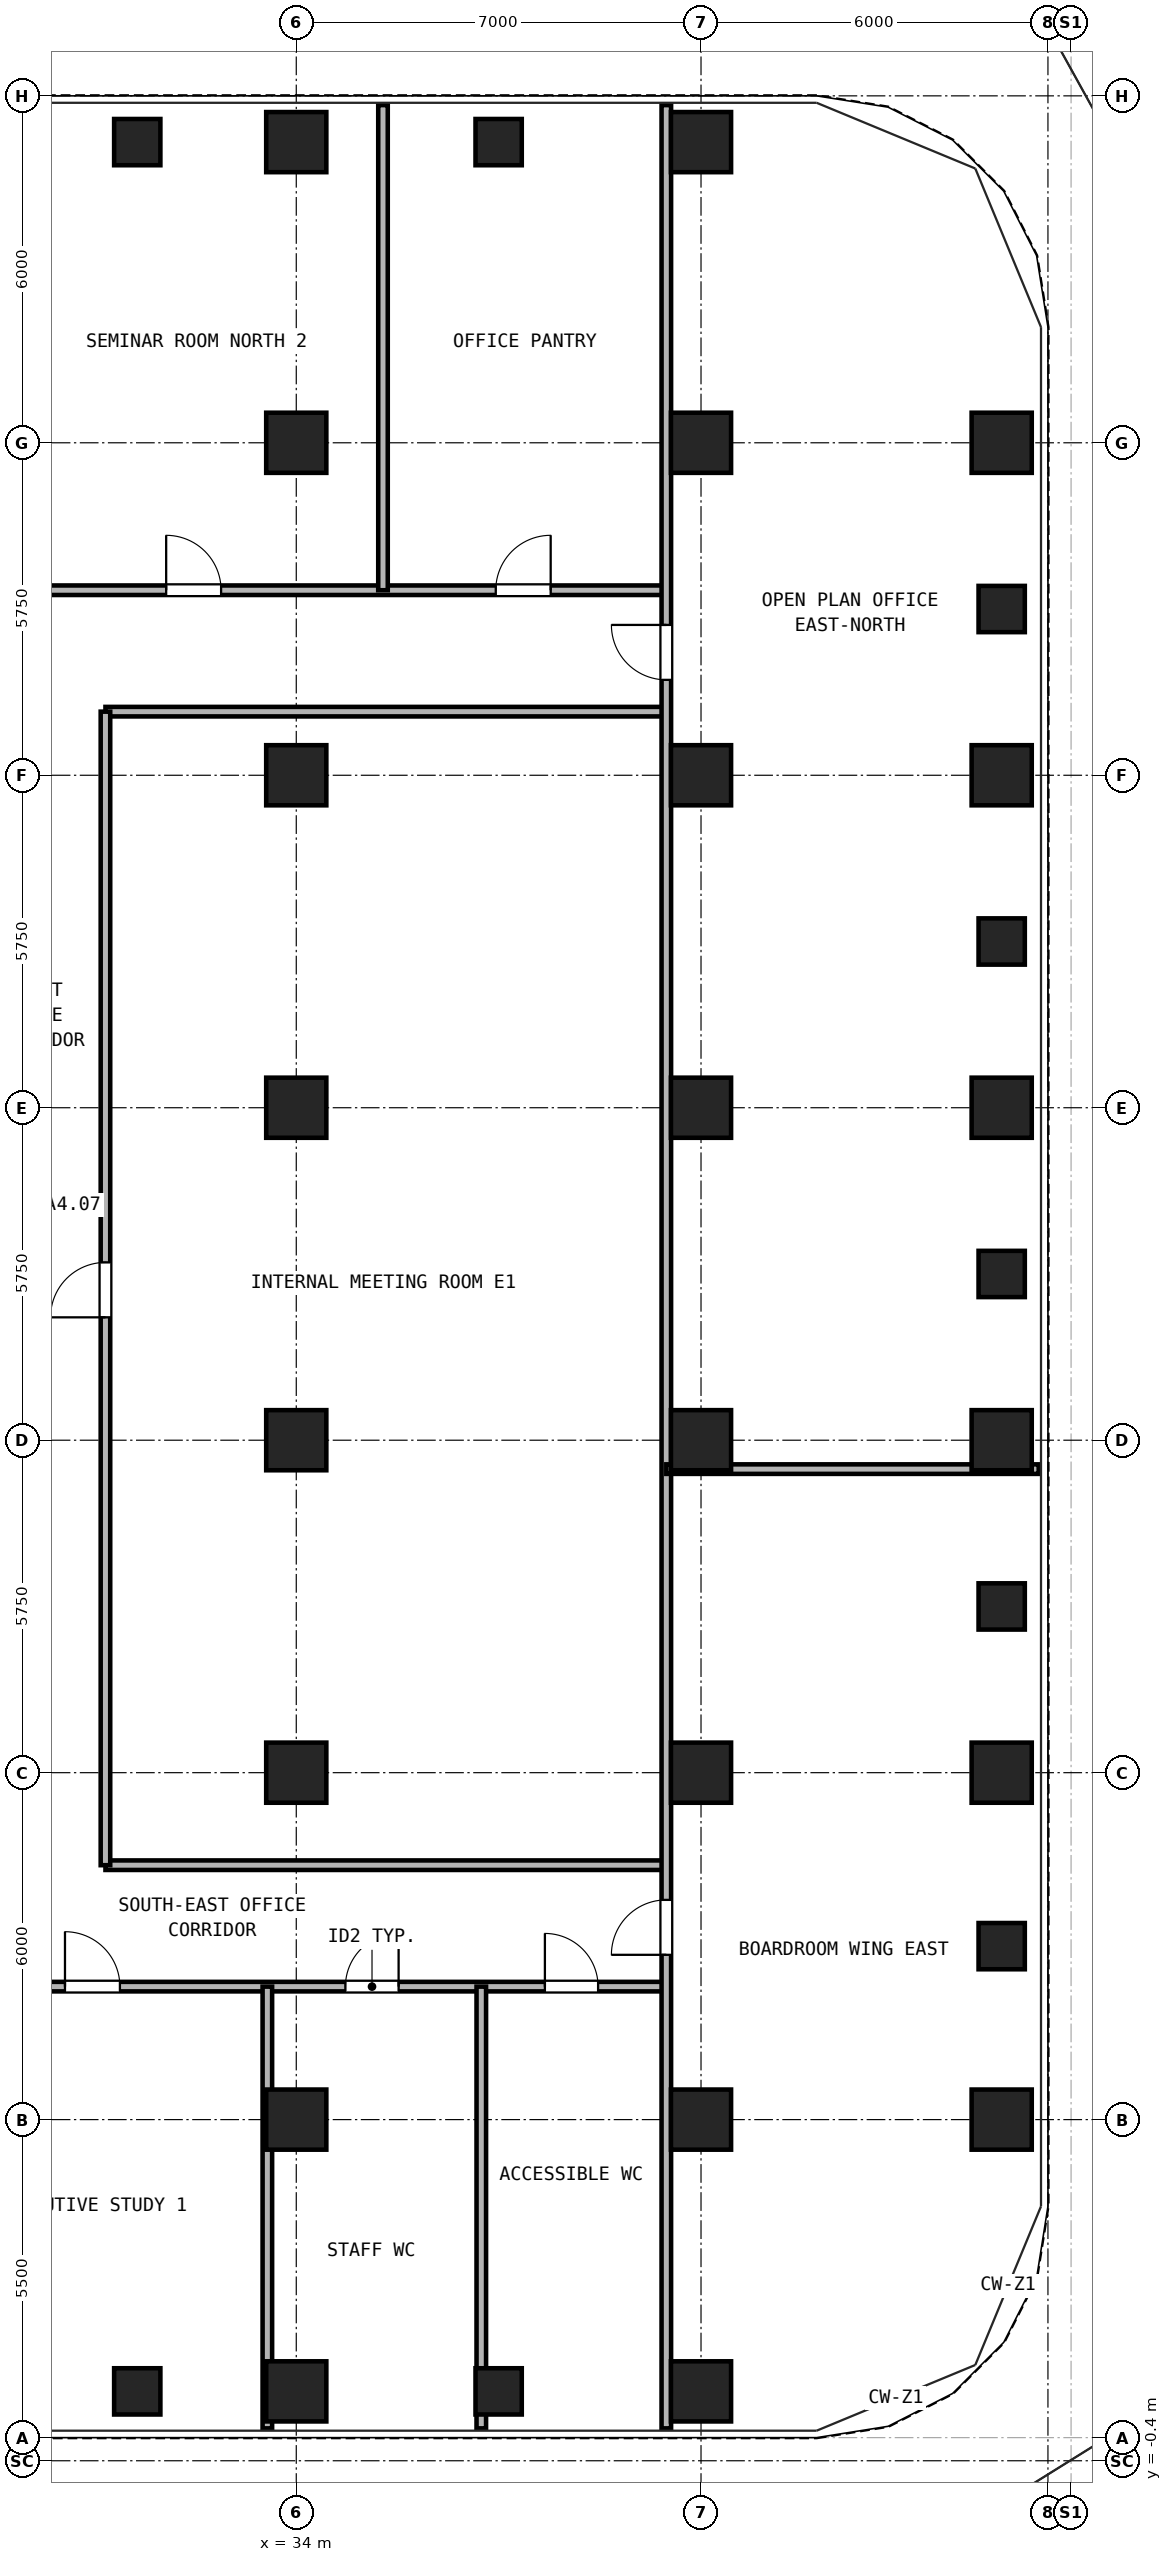
"""IFC4 building model, lengths in metres.
Left out: names, types, materials, properties, quantities, classifications, styles, units other than length and angle.
Written with IfcOpenShell. Run it as: python <this file> out.ifc"""

import sys

from ifc_helpers import new_model, si_unit, direction, frame, frame_2d, origin, origin_2d, place, context, subcontext, project, spatial, rectangle, hollow_rectangle, extrude, source, transform, mapped, element, fill, save


model = new_model("IFC4")
c1 = context("Model", 3, precision=1e-05, world=origin(), true_north=direction((0.0, 1.0)))
c2 = subcontext(c1, "Body", "Model", "MODEL_VIEW")
j1 = project(units=[si_unit("LENGTHUNIT", "METRE"), si_unit("PLANEANGLEUNIT", "RADIAN")], contexts=[c1])
p1 = place(None, origin())
s1 = spatial("IfcSite", under=j1, at=p1, CompositionType="ELEMENT")
p2 = place(p1, origin())
s2 = spatial("IfcBuilding", under=s1, at=p2, CompositionType="ELEMENT")
p3 = place(p2, frame((0.0, 0.0, 81.0)))
s3 = spatial("IfcBuildingStorey", under=s2, at=p3, CompositionType="ELEMENT", Elevation=81.0)
m1 = source(origin(), c2, "Body", "SweptSolid", [
    extrude(hollow_rectangle(XDim=1.04, YDim=1.04, WallThickness=0.065, at=origin_2d()), origin(), (0.0, 0.0, 1.0), 3.32),
])
for number, where, z_axis, x_axis in (
    (1, (34.0, 0.8, 0.0), (0.0, 0.0, 1.0), (1.0, 0.0, 0.0)),
    (2, (34.0, 39.7, 0.0), (0.0, 0.0, 1.0), (1.0, 0.0, 0.0)),
    (3, (41.0, 0.8, 0.0), (0.0, 0.0, 1.0), (1.0, 0.0, 0.0)),
    (4, (41.0, 39.7, 0.0), (0.0, 0.0, 1.0), (1.0, 0.0, 0.0)),
    (5, (46.2, 5.5, 0.0), (0.0, 0.0, 1.0), (1.0, 0.0, 0.0)),
    (6, (46.2, 11.5, 0.0), (0.0, 0.0, 1.0), (1.0, 0.0, 0.0)),
    (7, (46.2, 17.25, 0.0), (0.0, 0.0, 1.0), (1.0, 0.0, 0.0)),
    (8, (46.2, 23.0, 0.0), (0.0, 0.0, 1.0), (1.0, 0.0, 0.0)),
    (9, (46.2, 28.75, 0.0), (0.0, 0.0, 1.0), (1.0, 0.0, 0.0)),
    (10, (46.2, 34.5, 0.0), (0.0, 0.0, 1.0), (1.0, 0.0, 0.0)),
    (11, (34.0, 5.5, 0.0), (0.0, 0.0, 1.0), (1.0, 0.0, 0.0)),
    (12, (34.0, 11.5, 0.0), (0.0, 0.0, 1.0), (1.0, 0.0, 0.0)),
    (13, (34.0, 17.25, 0.0), (0.0, 0.0, 1.0), (1.0, 0.0, 0.0)),
    (14, (34.0, 23.0, 0.0), (0.0, 0.0, 1.0), (1.0, 0.0, 0.0)),
    (15, (34.0, 28.75, 0.0), (0.0, 0.0, 1.0), (1.0, 0.0, 0.0)),
    (16, (34.0, 34.5, 0.0), (0.0, 0.0, 1.0), (1.0, 0.0, 0.0)),
    (17, (41.0, 5.5, 0.0), (0.0, 0.0, 1.0), (1.0, 0.0, 0.0)),
    (18, (41.0, 11.5, 0.0), (0.0, 0.0, 1.0), (1.0, 0.0, 0.0)),
    (19, (41.0, 17.25, 0.0), (0.0, 0.0, 1.0), (1.0, 0.0, 0.0)),
    (20, (41.0, 23.0, 0.0), (0.0, 0.0, 1.0), (1.0, 0.0, 0.0)),
    (21, (41.0, 28.75, 0.0), (0.0, 0.0, 1.0), (1.0, 0.0, 0.0)),
    (22, (41.0, 34.5, 0.0), (0.0, 0.0, 1.0), (1.0, 0.0, 0.0)),
):
    element("IfcColumn", number, at=place(p3, frame(where, z_axis=z_axis, x_axis=x_axis)), inside=s3, PredefinedType="COLUMN", context=c2, shape_type="MappedRepresentation", body=[
        mapped(m1, transform((0.0, 0.0, 0.0), x_axis=(1.0, 0.0, 0.0), y_axis=(0.0, 1.0, 0.0), z_axis=(0.0, 0.0, 1.0), scale=1.0)),
    ])
m2 = source(origin(), c2, "Body", "SweptSolid", [
    extrude(hollow_rectangle(XDim=0.8, YDim=0.8, WallThickness=0.045, at=origin_2d()), origin(), (0.0, 0.0, 1.0), 3.32),
])
for number, where, z_axis, x_axis in (
    (23, (31.25, 0.8, 0.0), (0.0, 0.0, 1.0), (1.0, 0.0, 0.0)),
    (24, (31.25, 39.7, 0.0), (0.0, 0.0, 1.0), (1.0, 0.0, 0.0)),
    (25, (37.5, 0.8, 0.0), (0.0, 0.0, 1.0), (1.0, 0.0, 0.0)),
    (26, (37.5, 39.7, 0.0), (0.0, 0.0, 1.0), (1.0, 0.0, 0.0)),
    (27, (46.2, 8.5, 0.0), (0.0, 0.0, 1.0), (1.0, 0.0, 0.0)),
    (28, (46.2, 14.375, 0.0), (0.0, 0.0, 1.0), (1.0, 0.0, 0.0)),
    (29, (46.2, 20.125, 0.0), (0.0, 0.0, 1.0), (1.0, 0.0, 0.0)),
    (30, (46.2, 25.875, 0.0), (0.0, 0.0, 1.0), (1.0, 0.0, 0.0)),
    (31, (46.2, 31.625, 0.0), (0.0, 0.0, 1.0), (1.0, 0.0, 0.0)),
):
    element("IfcColumn", number, at=place(p3, frame(where, z_axis=z_axis, x_axis=x_axis)), inside=s3, PredefinedType="COLUMN", context=c2, shape_type="MappedRepresentation", body=[
        mapped(m2, transform((0.0, 0.0, 0.0), x_axis=(1.0, 0.0, 0.0), y_axis=(0.0, 1.0, 0.0), z_axis=(0.0, 0.0, 1.0), scale=1.0)),
    ])
p4 = place(p3, frame((6.6, 7.8, 0.0), z_axis=(0.0, 0.0, 1.0), x_axis=(1.0, 0.0, 0.0)))
e32 = element("IfcWall", 32, at=p4, inside=s3, PredefinedType="PARTITIONING", context=c2, shape_type="SweptSolid", body=[
    extrude(rectangle(XDim=33.8, YDim=0.165, at=frame_2d((16.9, 0.0))), origin(), (0.0, 0.0, 1.0), 3.32),
])
p5 = place(p4, frame((2.95, 0.0, 0.0)))
e33 = element("IfcOpeningElement", 33, at=p5, cuts=e32, PredefinedType="OPENING", context=c2, shape_type="SweptSolid", body=[
    extrude(rectangle(XDim=0.95, YDim=2.15, at=frame_2d((0.475, 1.075))), frame((0.0, 0.093, 0.0), z_axis=(0.0, -1.0, 0.0), x_axis=(1.0, 0.0, 0.0)), (0.0, 0.0, 1.0), 0.185),
])
p6 = place(p4, frame((9.9, 0.0, 0.0)))
e34 = element("IfcOpeningElement", 34, at=p6, cuts=e32, PredefinedType="OPENING", context=c2, shape_type="SweptSolid", body=[
    extrude(rectangle(XDim=0.95, YDim=2.15, at=frame_2d((0.475, 1.075))), frame((0.0, 0.093, 0.0), z_axis=(0.0, -1.0, 0.0), x_axis=(1.0, 0.0, 0.0)), (0.0, 0.0, 1.0), 0.185),
])
p7 = place(p4, frame((16.9, 0.0, 0.0)))
e35 = element("IfcOpeningElement", 35, at=p7, cuts=e32, PredefinedType="OPENING", context=c2, shape_type="SweptSolid", body=[
    extrude(rectangle(XDim=0.95, YDim=2.15, at=frame_2d((0.475, 1.075))), frame((0.0, 0.093, 0.0), z_axis=(0.0, -1.0, 0.0), x_axis=(1.0, 0.0, 0.0)), (0.0, 0.0, 1.0), 0.185),
])
p8 = place(p4, frame((23.4, 0.0, 0.0)))
e36 = element("IfcOpeningElement", 36, at=p8, cuts=e32, PredefinedType="OPENING", context=c2, shape_type="SweptSolid", body=[
    extrude(rectangle(XDim=0.95, YDim=2.15, at=frame_2d((0.475, 1.075))), frame((0.0, 0.093, 0.0), z_axis=(0.0, -1.0, 0.0), x_axis=(1.0, 0.0, 0.0)), (0.0, 0.0, 1.0), 0.185),
])
p9 = place(p4, frame((28.25, 0.0, 0.0)))
e37 = element("IfcOpeningElement", 37, at=p9, cuts=e32, PredefinedType="OPENING", context=c2, shape_type="SweptSolid", body=[
    extrude(rectangle(XDim=0.92, YDim=2.1, at=frame_2d((0.46, 1.05))), frame((0.0, 0.093, 0.0), z_axis=(0.0, -1.0, 0.0), x_axis=(1.0, 0.0, 0.0)), (0.0, 0.0, 1.0), 0.185),
])
p10 = place(p4, frame((31.7, 0.0, 0.0)))
e38 = element("IfcOpeningElement", 38, at=p10, cuts=e32, PredefinedType="OPENING", context=c2, shape_type="SweptSolid", body=[
    extrude(rectangle(XDim=0.92, YDim=2.1, at=frame_2d((0.46, 1.05))), frame((0.0, 0.093, 0.0), z_axis=(0.0, -1.0, 0.0), x_axis=(1.0, 0.0, 0.0)), (0.0, 0.0, 1.0), 0.185),
])
p11 = place(p3, frame((6.6, 31.95, 0.0), z_axis=(0.0, 0.0, 1.0), x_axis=(1.0, 0.0, 0.0)))
e39 = element("IfcWall", 39, at=p11, inside=s3, PredefinedType="PARTITIONING", context=c2, shape_type="SweptSolid", body=[
    extrude(rectangle(XDim=33.8, YDim=0.165, at=frame_2d((16.9, 0.0))), origin(), (0.0, 0.0, 1.0), 3.32),
])
p12 = place(p11, frame((3.2, 0.0, 0.0)))
e40 = element("IfcOpeningElement", 40, at=p12, cuts=e39, PredefinedType="OPENING", context=c2, shape_type="SweptSolid", body=[
    extrude(rectangle(XDim=0.95, YDim=2.15, at=frame_2d((0.475, 1.075))), frame((0.0, 0.093, 0.0), z_axis=(0.0, -1.0, 0.0), x_axis=(1.0, 0.0, 0.0)), (0.0, 0.0, 1.0), 0.185),
])
p13 = place(p11, frame((10.65, 0.0, 0.0)))
e41 = element("IfcOpeningElement", 41, at=p13, cuts=e39, PredefinedType="OPENING", context=c2, shape_type="SweptSolid", body=[
    extrude(rectangle(XDim=0.95, YDim=2.15, at=frame_2d((0.475, 1.075))), frame((0.0, 0.093, 0.0), z_axis=(0.0, -1.0, 0.0), x_axis=(1.0, 0.0, 0.0)), (0.0, 0.0, 1.0), 0.185),
])
p14 = place(p11, frame((18.15, 0.0, 0.0)))
e42 = element("IfcOpeningElement", 42, at=p14, cuts=e39, PredefinedType="OPENING", context=c2, shape_type="SweptSolid", body=[
    extrude(rectangle(XDim=0.95, YDim=2.15, at=frame_2d((0.475, 1.075))), frame((0.0, 0.093, 0.0), z_axis=(0.0, -1.0, 0.0), x_axis=(1.0, 0.0, 0.0)), (0.0, 0.0, 1.0), 0.185),
])
p15 = place(p11, frame((25.15, 0.0, 0.0)))
e43 = element("IfcOpeningElement", 43, at=p15, cuts=e39, PredefinedType="OPENING", context=c2, shape_type="SweptSolid", body=[
    extrude(rectangle(XDim=0.95, YDim=2.15, at=frame_2d((0.475, 1.075))), frame((0.0, 0.093, 0.0), z_axis=(0.0, -1.0, 0.0), x_axis=(1.0, 0.0, 0.0)), (0.0, 0.0, 1.0), 0.185),
])
p16 = place(p11, frame((30.85, 0.0, 0.0)))
e44 = element("IfcOpeningElement", 44, at=p16, cuts=e39, PredefinedType="OPENING", context=c2, shape_type="SweptSolid", body=[
    extrude(rectangle(XDim=0.95, YDim=2.15, at=frame_2d((0.475, 1.075))), frame((0.0, 0.093, 0.0), z_axis=(0.0, -1.0, 0.0), x_axis=(1.0, 0.0, 0.0)), (0.0, 0.0, 1.0), 0.185),
])
for number, where, z_axis, x_axis in (
    (45, (30.7, 9.9, 0.0), (0.0, 0.0, 1.0), (1.0, 0.0, 0.0)),
    (46, (30.7, 29.85, 0.0), (0.0, 0.0, 1.0), (1.0, 0.0, 0.0)),
):
    element("IfcWall", number, at=place(p3, frame(where, z_axis=z_axis, x_axis=x_axis)), inside=s3, PredefinedType="PARTITIONING", context=c2, shape_type="SweptSolid", body=[
        extrude(rectangle(XDim=9.7, YDim=0.165, at=frame_2d((4.85, 0.0))), origin(), (0.0, 0.0, 1.0), 3.32),
    ])
p17 = place(p3, frame((30.7, 9.9, 0.0), z_axis=(0.0, 0.0, 1.0), x_axis=(0.0, 1.0, 0.0)))
e47 = element("IfcWall", 47, at=p17, inside=s3, PredefinedType="PARTITIONING", context=c2, shape_type="SweptSolid", body=[
    extrude(rectangle(XDim=19.95, YDim=0.165, at=frame_2d((9.975, 0.0))), origin(), (0.0, 0.0, 1.0), 3.32),
])
p18 = place(p17, frame((9.475, 0.0, 0.0)))
e48 = element("IfcOpeningElement", 48, at=p18, cuts=e47, PredefinedType="OPENING", context=c2, shape_type="SweptSolid", body=[
    extrude(rectangle(XDim=0.95, YDim=2.15, at=frame_2d((0.475, 1.075))), frame((0.0, 0.093, 0.0), z_axis=(0.0, -1.0, 0.0), x_axis=(1.0, 0.0, 0.0)), (0.0, 0.0, 1.0), 0.185),
])
p19 = place(p3, frame((40.4, 0.16, 0.0), z_axis=(0.0, 0.0, 1.0), x_axis=(0.0, 1.0, 0.0)))
e49 = element("IfcWall", 49, at=p19, inside=s3, PredefinedType="PARTITIONING", context=c2, shape_type="SweptSolid", body=[
    extrude(rectangle(XDim=40.18, YDim=0.165, at=frame_2d((20.09, 0.0))), origin(), (0.0, 0.0, 1.0), 3.32),
])
p20 = place(p19, frame((8.19, 0.0, 0.0)))
e50 = element("IfcOpeningElement", 50, at=p20, cuts=e49, PredefinedType="OPENING", context=c2, shape_type="SweptSolid", body=[
    extrude(rectangle(XDim=0.95, YDim=2.15, at=frame_2d((0.475, 1.075))), frame((0.0, 0.093, 0.0), z_axis=(0.0, -1.0, 0.0), x_axis=(1.0, 0.0, 0.0)), (0.0, 0.0, 1.0), 0.185),
])
p21 = place(p19, frame((30.24, 0.0, 0.0)))
e51 = element("IfcOpeningElement", 51, at=p21, cuts=e49, PredefinedType="OPENING", context=c2, shape_type="SweptSolid", body=[
    extrude(rectangle(XDim=0.95, YDim=2.15, at=frame_2d((0.475, 1.075))), frame((0.0, 0.093, 0.0), z_axis=(0.0, -1.0, 0.0), x_axis=(1.0, 0.0, 0.0)), (0.0, 0.0, 1.0), 0.185),
])
for number, where, z_axis, x_axis in (
    (52, (33.5, 0.16, 0.0), (0.0, 0.0, 1.0), (0.0, 1.0, 0.0)),
    (53, (37.2, 0.16, 0.0), (0.0, 0.0, 1.0), (0.0, 1.0, 0.0)),
):
    element("IfcWall", number, at=place(p3, frame(where, z_axis=z_axis, x_axis=x_axis)), inside=s3, PredefinedType="PARTITIONING", context=c2, shape_type="SweptSolid", body=[
        extrude(rectangle(XDim=7.64, YDim=0.165, at=frame_2d((3.82, 0.0))), origin(), (0.0, 0.0, 1.0), 3.32),
    ])
p22 = place(p3, frame((35.5, 31.95, 0.0), z_axis=(0.0, 0.0, 1.0), x_axis=(0.0, 1.0, 0.0)))
e54 = element("IfcWall", 54, at=p22, inside=s3, PredefinedType="PARTITIONING", context=c2, shape_type="SweptSolid", body=[
    extrude(rectangle(XDim=8.39, YDim=0.165, at=frame_2d((4.195, 0.0))), origin(), (0.0, 0.0, 1.0), 3.32),
])
p23 = place(p3, frame((40.4, 16.75, 0.0), z_axis=(0.0, 0.0, 1.0), x_axis=(1.0, 0.0, 0.0)))
e55 = element("IfcWall", 55, at=p23, inside=s3, PredefinedType="PARTITIONING", context=c2, shape_type="SweptSolid", body=[
    extrude(rectangle(XDim=6.44, YDim=0.165, at=frame_2d((3.22, 0.0))), origin(), (0.0, 0.0, 1.0), 3.32),
])
p24 = place(p8, frame((0.95, 0.0, 0.0), z_axis=(0.0, 0.0, 1.0), x_axis=(-1.0, 0.0, 0.0)))
e56 = element("IfcDoor", 56, at=p24, inside=s3, OperationType="SINGLE_SWING_LEFT", PredefinedType="DOOR", context=c2, shape_type="SweptSolid", body=[
    extrude(rectangle(XDim=0.95, YDim=2.15, at=frame_2d((0.475, 1.075))), frame((0.0, 0.025, 0.0), z_axis=(0.0, -1.0, 0.0), x_axis=(1.0, 0.0, 0.0)), (0.0, 0.0, 1.0), 0.05),
])
fill(e36, e56)
p25 = place(p9, frame((0.92, 0.0, 0.0), z_axis=(0.0, 0.0, 1.0), x_axis=(-1.0, 0.0, 0.0)))
e57 = element("IfcDoor", 57, at=p25, inside=s3, OperationType="SINGLE_SWING_RIGHT", PredefinedType="DOOR", context=c2, shape_type="SweptSolid", body=[
    extrude(rectangle(XDim=0.92, YDim=2.1, at=frame_2d((0.46, 1.05))), frame((0.0, 0.025, 0.0), z_axis=(0.0, -1.0, 0.0), x_axis=(1.0, 0.0, 0.0)), (0.0, 0.0, 1.0), 0.05),
])
fill(e37, e57)
p26 = place(p10, frame((0.92, 0.0, 0.0), z_axis=(0.0, 0.0, 1.0), x_axis=(-1.0, 0.0, 0.0)))
e58 = element("IfcDoor", 58, at=p26, inside=s3, OperationType="SINGLE_SWING_LEFT", PredefinedType="DOOR", context=c2, shape_type="SweptSolid", body=[
    extrude(rectangle(XDim=0.92, YDim=2.1, at=frame_2d((0.46, 1.05))), frame((0.0, 0.025, 0.0), z_axis=(0.0, -1.0, 0.0), x_axis=(1.0, 0.0, 0.0)), (0.0, 0.0, 1.0), 0.05),
])
fill(e38, e58)
p27 = place(p15, origin())
e59 = element("IfcDoor", 59, at=p27, inside=s3, OperationType="SINGLE_SWING_LEFT", PredefinedType="DOOR", context=c2, shape_type="SweptSolid", body=[
    extrude(rectangle(XDim=0.95, YDim=2.15, at=frame_2d((0.475, 1.075))), frame((0.0, 0.025, 0.0), z_axis=(0.0, -1.0, 0.0), x_axis=(1.0, 0.0, 0.0)), (0.0, 0.0, 1.0), 0.05),
])
fill(e43, e59)
p28 = place(p16, origin())
e60 = element("IfcDoor", 60, at=p28, inside=s3, OperationType="SINGLE_SWING_RIGHT", PredefinedType="DOOR", context=c2, shape_type="SweptSolid", body=[
    extrude(rectangle(XDim=0.95, YDim=2.15, at=frame_2d((0.475, 1.075))), frame((0.0, 0.025, 0.0), z_axis=(0.0, -1.0, 0.0), x_axis=(1.0, 0.0, 0.0)), (0.0, 0.0, 1.0), 0.05),
])
fill(e44, e60)
p29 = place(p20, origin())
e61 = element("IfcDoor", 61, at=p29, inside=s3, OperationType="SINGLE_SWING_LEFT", PredefinedType="DOOR", context=c2, shape_type="SweptSolid", body=[
    extrude(rectangle(XDim=0.95, YDim=2.15, at=frame_2d((0.475, 1.075))), frame((0.0, 0.025, 0.0), z_axis=(0.0, -1.0, 0.0), x_axis=(1.0, 0.0, 0.0)), (0.0, 0.0, 1.0), 0.05),
])
fill(e50, e61)
p30 = place(p21, origin())
e62 = element("IfcDoor", 62, at=p30, inside=s3, OperationType="SINGLE_SWING_RIGHT", PredefinedType="DOOR", context=c2, shape_type="SweptSolid", body=[
    extrude(rectangle(XDim=0.95, YDim=2.15, at=frame_2d((0.475, 1.075))), frame((0.0, 0.025, 0.0), z_axis=(0.0, -1.0, 0.0), x_axis=(1.0, 0.0, 0.0)), (0.0, 0.0, 1.0), 0.05),
])
fill(e51, e62)
p31 = place(p18, origin())
e63 = element("IfcDoor", 63, at=p31, inside=s3, OperationType="SINGLE_SWING_LEFT", PredefinedType="DOOR", context=c2, shape_type="SweptSolid", body=[
    extrude(rectangle(XDim=0.95, YDim=2.15, at=frame_2d((0.475, 1.075))), frame((0.0, 0.025, 0.0), z_axis=(0.0, -1.0, 0.0), x_axis=(1.0, 0.0, 0.0)), (0.0, 0.0, 1.0), 0.05),
])
fill(e48, e63)
save(model, sys.argv[1])
